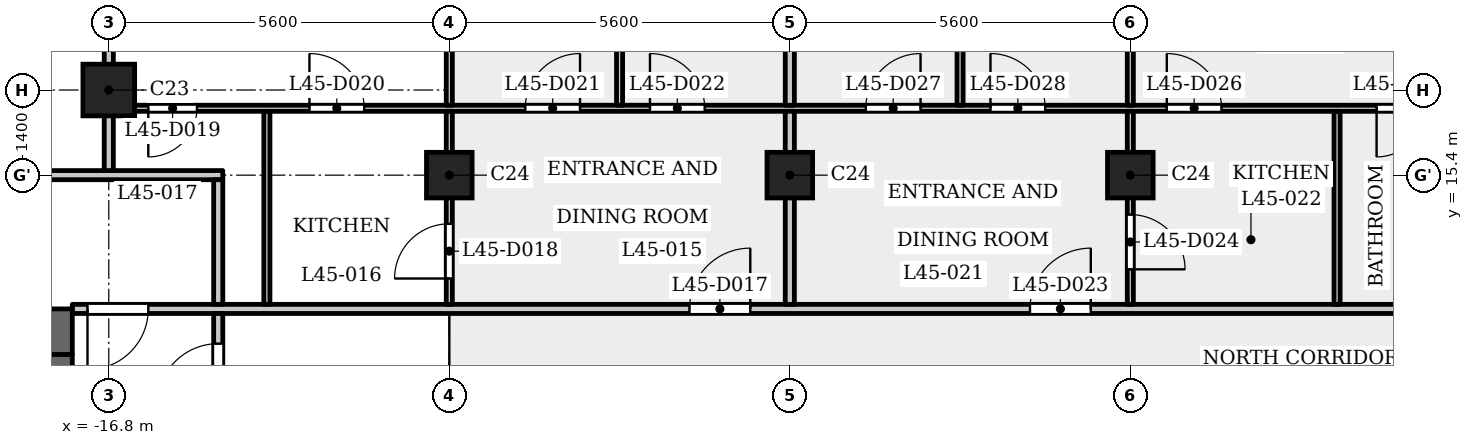
"""IFC4 building model, lengths in metres.
Left out: names, types, materials, properties, quantities, classifications, styles, units other than length and angle.
Written with IfcOpenShell. Run it as: python <this file> out.ifc"""

import sys

from ifc_helpers import new_model, si_unit, direction, frame, frame_2d, origin, origin_2d, place, context, subcontext, project, spatial, rectangle, extrude, element, fill, save


model = new_model("IFC4")
c1 = context("Model", 3, precision=1e-05, world=origin(), true_north=direction((0.0, 1.0)))
c2 = subcontext(c1, "Body", "Model", "MODEL_VIEW")
j1 = project(units=[si_unit("LENGTHUNIT", "METRE"), si_unit("PLANEANGLEUNIT", "RADIAN")], contexts=[c1])
p1 = place(None, origin())
s1 = spatial("IfcSite", under=j1, at=p1, CompositionType="ELEMENT")
p2 = place(p1, origin())
s2 = spatial("IfcBuilding", under=s1, at=p2, CompositionType="ELEMENT")
p3 = place(p2, frame((0.0, 0.0, 174.6)))
s3 = spatial("IfcBuildingStorey", under=s2, at=p3, CompositionType="ELEMENT", Elevation=174.6)
p4 = place(p3, frame((-16.8, 16.8, 0.0), z_axis=(0.0, 0.0, 1.0), x_axis=(1.0, 0.0, 0.0)))
e1 = element("IfcColumn", 1, at=p4, inside=s3, PredefinedType="COLUMN", context=c2, shape_type="SweptSolid", body=[
    extrude(rectangle(XDim=0.85, YDim=0.85, at=origin_2d()), origin(), (0.0, 0.0, 1.0), 3.5),
])
for number, where, z_axis, x_axis in (
    (2, (-11.2, 15.4, 0.0), (0.0, 0.0, 1.0), (1.0, 0.0, 0.0)),
    (3, (-5.6, 15.4, 0.0), (0.0, 0.0, 1.0), (1.0, 0.0, 0.0)),
    (4, (0.0, 15.4, 0.0), (0.0, 0.0, 1.0), (1.0, 0.0, 0.0)),
):
    element("IfcColumn", number, at=place(p3, frame(where, z_axis=z_axis, x_axis=x_axis)), inside=s3, PredefinedType="COLUMN", context=c2, shape_type="SweptSolid", body=[
        extrude(rectangle(XDim=0.75, YDim=0.75, at=origin_2d()), origin(), (0.0, 0.0, 1.0), 3.5),
    ])
p5 = place(p3, frame((-17.4, 12.825, 0.0), z_axis=(0.0, 0.0, 1.0), x_axis=(-1.0, 0.0, 0.0)))
e5 = element("IfcWall", 5, at=p5, inside=s3, PredefinedType="SHEAR", context=c2, shape_type="SweptSolid", body=[
    extrude(rectangle(XDim=10.4, YDim=0.75, at=frame_2d((5.2, 0.0))), origin(), (0.0, 0.0, 1.0), 3.15),
])
p6 = place(p3, frame((-17.6, -12.45, 0.0), z_axis=(0.0, 0.0, 1.0), x_axis=(0.0, 1.0, 0.0)))
e6 = element("IfcWall", 6, at=p6, inside=s3, PredefinedType="SHEAR", context=c2, shape_type="SweptSolid", body=[
    extrude(rectangle(XDim=24.9, YDim=0.4, at=frame_2d((12.45, 0.0))), origin(), (0.0, 0.0, 1.0), 3.15),
])
p7 = place(p6, frame((8.65, 0.0, 0.0)))
e7 = element("IfcOpeningElement", 7, at=p7, cuts=e6, PredefinedType="OPENING", context=c2, shape_type="SweptSolid", body=[
    extrude(rectangle(XDim=0.9, YDim=2.1, at=frame_2d((0.45, 1.05))), frame((0.0, 0.21, 0.0), z_axis=(0.0, -1.0, 0.0), x_axis=(1.0, 0.0, 0.0)), (0.0, 0.0, 1.0), 0.42),
])
p8 = place(p6, frame((15.6, 0.0, 0.0)))
e8 = element("IfcOpeningElement", 8, at=p8, cuts=e6, PredefinedType="OPENING", context=c2, shape_type="SweptSolid", body=[
    extrude(rectangle(XDim=1.1, YDim=2.1, at=frame_2d((0.55, 1.05))), frame((0.0, 0.21, 0.0), z_axis=(0.0, -1.0, 0.0), x_axis=(1.0, 0.0, 0.0)), (0.0, 0.0, 1.0), 0.42),
])
p9 = place(p6, frame((18.0, 0.0, 0.0)))
e9 = element("IfcOpeningElement", 9, at=p9, cuts=e6, PredefinedType="OPENING", context=c2, shape_type="SweptSolid", body=[
    extrude(rectangle(XDim=1.1, YDim=2.1, at=frame_2d((0.55, 1.05))), frame((0.0, 0.21, 0.0), z_axis=(0.0, -1.0, 0.0), x_axis=(1.0, 0.0, 0.0)), (0.0, 0.0, 1.0), 0.42),
])
p10 = place(p6, frame((23.025, 0.0, 0.0)))
e10 = element("IfcOpeningElement", 10, at=p10, cuts=e6, PredefinedType="OPENING", context=c2, shape_type="SweptSolid", body=[
    extrude(rectangle(XDim=1.1, YDim=2.1, at=frame_2d((0.55, 1.05))), frame((0.0, 0.21, 0.0), z_axis=(0.0, -1.0, 0.0), x_axis=(1.0, 0.0, 0.0)), (0.0, 0.0, 1.0), 0.42),
])
p11 = place(p6, frame((0.775, 0.0, 0.0)))
e11 = element("IfcOpeningElement", 11, at=p11, cuts=e6, PredefinedType="OPENING", context=c2, shape_type="SweptSolid", body=[
    extrude(rectangle(XDim=1.1, YDim=2.1, at=frame_2d((0.55, 1.05))), frame((0.0, 0.21, 0.0), z_axis=(0.0, -1.0, 0.0), x_axis=(1.0, 0.0, 0.0)), (0.0, 0.0, 1.0), 0.42),
])
p12 = place(p6, frame((12.925, 0.0, 0.0)))
e12 = element("IfcOpeningElement", 12, at=p12, cuts=e6, PredefinedType="OPENING", context=c2, shape_type="SweptSolid", body=[
    extrude(rectangle(XDim=1.8, YDim=2.1, at=frame_2d((0.9, 1.05))), frame((0.0, 0.21, 0.0), z_axis=(0.0, -1.0, 0.0), x_axis=(1.0, 0.0, 0.0)), (0.0, 0.0, 1.0), 0.42),
])
p13 = place(p3, frame((-17.4, 13.2, 0.0), z_axis=(0.0, 0.0, 1.0), x_axis=(1.0, 0.0, 0.0)))
e13 = element("IfcWall", 13, at=p13, inside=s3, PredefinedType="PARTITIONING", context=c2, shape_type="SweptSolid", body=[
    extrude(rectangle(XDim=34.8, YDim=0.15, at=frame_2d((17.4, 0.0))), origin(), (0.0, 0.0, 1.0), 3.15),
])
p14 = place(p13, frame((0.25, 0.0, 0.0)))
e14 = element("IfcOpeningElement", 14, at=p14, cuts=e13, PredefinedType="OPENING", context=c2, shape_type="SweptSolid", body=[
    extrude(rectangle(XDim=1.0, YDim=2.1, at=frame_2d((0.5, 1.05))), frame((0.0, 0.085, 0.0), z_axis=(0.0, -1.0, 0.0), x_axis=(1.0, 0.0, 0.0)), (0.0, 0.0, 1.0), 0.17),
])
p15 = place(p13, frame((33.65, 0.0, 0.0)))
e15 = element("IfcOpeningElement", 15, at=p15, cuts=e13, PredefinedType="OPENING", context=c2, shape_type="SweptSolid", body=[
    extrude(rectangle(XDim=1.0, YDim=2.1, at=frame_2d((0.5, 1.05))), frame((0.0, 0.085, 0.0), z_axis=(0.0, -1.0, 0.0), x_axis=(1.0, 0.0, 0.0)), (0.0, 0.0, 1.0), 0.17),
])
p16 = place(p13, frame((10.15, 0.0, 0.0)))
e16 = element("IfcOpeningElement", 16, at=p16, cuts=e13, PredefinedType="OPENING", context=c2, shape_type="SweptSolid", body=[
    extrude(rectangle(XDim=1.0, YDim=2.1, at=frame_2d((0.5, 1.05))), frame((0.0, 0.085, 0.0), z_axis=(0.0, -1.0, 0.0), x_axis=(1.0, 0.0, 0.0)), (0.0, 0.0, 1.0), 0.17),
])
p17 = place(p13, frame((15.75, 0.0, 0.0)))
e17 = element("IfcOpeningElement", 17, at=p17, cuts=e13, PredefinedType="OPENING", context=c2, shape_type="SweptSolid", body=[
    extrude(rectangle(XDim=1.0, YDim=2.1, at=frame_2d((0.5, 1.05))), frame((0.0, 0.085, 0.0), z_axis=(0.0, -1.0, 0.0), x_axis=(1.0, 0.0, 0.0)), (0.0, 0.0, 1.0), 0.17),
])
p18 = place(p13, frame((24.95, 0.0, 0.0)))
e18 = element("IfcOpeningElement", 18, at=p18, cuts=e13, PredefinedType="OPENING", context=c2, shape_type="SweptSolid", body=[
    extrude(rectangle(XDim=1.0, YDim=2.1, at=frame_2d((0.5, 1.05))), frame((0.0, 0.085, 0.0), z_axis=(0.0, -1.0, 0.0), x_axis=(1.0, 0.0, 0.0)), (0.0, 0.0, 1.0), 0.17),
])
p19 = place(p13, frame((29.95, 0.0, 0.0)))
e19 = element("IfcOpeningElement", 19, at=p19, cuts=e13, PredefinedType="OPENING", context=c2, shape_type="SweptSolid", body=[
    extrude(rectangle(XDim=1.0, YDim=2.1, at=frame_2d((0.5, 1.05))), frame((0.0, 0.085, 0.0), z_axis=(0.0, -1.0, 0.0), x_axis=(1.0, 0.0, 0.0)), (0.0, 0.0, 1.0), 0.17),
])
p20 = place(p3, frame((-27.484, 15.4, 0.0), z_axis=(0.0, 0.0, 1.0), x_axis=(1.0, 0.0, 0.0)))
e20 = element("IfcWall", 20, at=p20, inside=s3, PredefinedType="PARTITIONING", context=c2, shape_type="SweptSolid", body=[
    extrude(rectangle(XDim=12.559, YDim=0.15, at=frame_2d((6.279, 0.0))), origin(), (0.0, 0.0, 1.0), 3.15),
])
p21 = place(p20, frame((5.784, 0.0, 0.0)))
e21 = element("IfcOpeningElement", 21, at=p21, cuts=e20, PredefinedType="OPENING", context=c2, shape_type="SweptSolid", body=[
    extrude(rectangle(XDim=1.0, YDim=2.1, at=frame_2d((0.5, 1.05))), frame((0.0, 0.085, 0.0), z_axis=(0.0, -1.0, 0.0), x_axis=(1.0, 0.0, 0.0)), (0.0, 0.0, 1.0), 0.17),
])
p22 = place(p3, frame((-16.725, 16.5, 0.0), z_axis=(0.0, 0.0, 1.0), x_axis=(1.0, 0.0, 0.0)))
e22 = element("IfcWall", 22, at=p22, inside=s3, PredefinedType="PARTITIONING", context=c2, shape_type="SweptSolid", body=[
    extrude(rectangle(XDim=33.45, YDim=0.1, at=frame_2d((16.725, 0.0))), origin(), (0.0, 0.0, 1.0), 3.15),
])
p23 = place(p22, frame((0.575, 0.0, 0.0)))
e23 = element("IfcOpeningElement", 23, at=p23, cuts=e22, PredefinedType="OPENING", context=c2, shape_type="SweptSolid", body=[
    extrude(rectangle(XDim=0.8, YDim=2.1, at=frame_2d((0.4, 1.05))), frame((0.0, 0.06, 0.0), z_axis=(0.0, -1.0, 0.0), x_axis=(1.0, 0.0, 0.0)), (0.0, 0.0, 1.0), 0.12),
])
p24 = place(p22, frame((3.225, 0.0, 0.0)))
e24 = element("IfcOpeningElement", 24, at=p24, cuts=e22, PredefinedType="OPENING", context=c2, shape_type="SweptSolid", body=[
    extrude(rectangle(XDim=0.9, YDim=2.1, at=frame_2d((0.45, 1.05))), frame((0.0, 0.06, 0.0), z_axis=(0.0, -1.0, 0.0), x_axis=(1.0, 0.0, 0.0)), (0.0, 0.0, 1.0), 0.12),
])
p25 = place(p22, frame((6.775, 0.0, 0.0)))
e25 = element("IfcOpeningElement", 25, at=p25, cuts=e22, PredefinedType="OPENING", context=c2, shape_type="SweptSolid", body=[
    extrude(rectangle(XDim=0.9, YDim=2.1, at=frame_2d((0.45, 1.05))), frame((0.0, 0.06, 0.0), z_axis=(0.0, -1.0, 0.0), x_axis=(1.0, 0.0, 0.0)), (0.0, 0.0, 1.0), 0.12),
])
p26 = place(p22, frame((8.825, 0.0, 0.0)))
e26 = element("IfcOpeningElement", 26, at=p26, cuts=e22, PredefinedType="OPENING", context=c2, shape_type="SweptSolid", body=[
    extrude(rectangle(XDim=0.9, YDim=2.1, at=frame_2d((0.45, 1.05))), frame((0.0, 0.06, 0.0), z_axis=(0.0, -1.0, 0.0), x_axis=(1.0, 0.0, 0.0)), (0.0, 0.0, 1.0), 0.12),
])
p27 = place(p22, frame((20.775, 0.0, 0.0)))
e27 = element("IfcOpeningElement", 27, at=p27, cuts=e22, PredefinedType="OPENING", context=c2, shape_type="SweptSolid", body=[
    extrude(rectangle(XDim=0.8, YDim=2.1, at=frame_2d((0.4, 1.05))), frame((0.0, 0.06, 0.0), z_axis=(0.0, -1.0, 0.0), x_axis=(1.0, 0.0, 0.0)), (0.0, 0.0, 1.0), 0.12),
])
p28 = place(p22, frame((17.325, 0.0, 0.0)))
e28 = element("IfcOpeningElement", 28, at=p28, cuts=e22, PredefinedType="OPENING", context=c2, shape_type="SweptSolid", body=[
    extrude(rectangle(XDim=0.9, YDim=2.1, at=frame_2d((0.45, 1.05))), frame((0.0, 0.06, 0.0), z_axis=(0.0, -1.0, 0.0), x_axis=(1.0, 0.0, 0.0)), (0.0, 0.0, 1.0), 0.12),
])
p29 = place(p22, frame((12.375, 0.0, 0.0)))
e29 = element("IfcOpeningElement", 29, at=p29, cuts=e22, PredefinedType="OPENING", context=c2, shape_type="SweptSolid", body=[
    extrude(rectangle(XDim=0.9, YDim=2.1, at=frame_2d((0.45, 1.05))), frame((0.0, 0.06, 0.0), z_axis=(0.0, -1.0, 0.0), x_axis=(1.0, 0.0, 0.0)), (0.0, 0.0, 1.0), 0.12),
])
p30 = place(p22, frame((14.425, 0.0, 0.0)))
e30 = element("IfcOpeningElement", 30, at=p30, cuts=e22, PredefinedType="OPENING", context=c2, shape_type="SweptSolid", body=[
    extrude(rectangle(XDim=0.9, YDim=2.1, at=frame_2d((0.45, 1.05))), frame((0.0, 0.06, 0.0), z_axis=(0.0, -1.0, 0.0), x_axis=(1.0, 0.0, 0.0)), (0.0, 0.0, 1.0), 0.12),
])
p31 = place(p22, frame((26.575, 0.0, 0.0)))
e31 = element("IfcOpeningElement", 31, at=p31, cuts=e22, PredefinedType="OPENING", context=c2, shape_type="SweptSolid", body=[
    extrude(rectangle(XDim=0.8, YDim=2.1, at=frame_2d((0.4, 1.05))), frame((0.0, 0.06, 0.0), z_axis=(0.0, -1.0, 0.0), x_axis=(1.0, 0.0, 0.0)), (0.0, 0.0, 1.0), 0.12),
])
p32 = place(p22, frame((23.775, 0.0, 0.0)))
e32 = element("IfcOpeningElement", 32, at=p32, cuts=e22, PredefinedType="OPENING", context=c2, shape_type="SweptSolid", body=[
    extrude(rectangle(XDim=0.9, YDim=2.1, at=frame_2d((0.45, 1.05))), frame((0.0, 0.06, 0.0), z_axis=(0.0, -1.0, 0.0), x_axis=(1.0, 0.0, 0.0)), (0.0, 0.0, 1.0), 0.12),
])
p33 = place(p22, frame((32.075, 0.0, 0.0)))
e33 = element("IfcOpeningElement", 33, at=p33, cuts=e22, PredefinedType="OPENING", context=c2, shape_type="SweptSolid", body=[
    extrude(rectangle(XDim=0.8, YDim=2.1, at=frame_2d((0.4, 1.05))), frame((0.0, 0.06, 0.0), z_axis=(0.0, -1.0, 0.0), x_axis=(1.0, 0.0, 0.0)), (0.0, 0.0, 1.0), 0.12),
])
p34 = place(p22, frame((29.375, 0.0, 0.0)))
e34 = element("IfcOpeningElement", 34, at=p34, cuts=e22, PredefinedType="OPENING", context=c2, shape_type="SweptSolid", body=[
    extrude(rectangle(XDim=0.9, YDim=2.1, at=frame_2d((0.45, 1.05))), frame((0.0, 0.06, 0.0), z_axis=(0.0, -1.0, 0.0), x_axis=(1.0, 0.0, 0.0)), (0.0, 0.0, 1.0), 0.12),
])
p35 = place(p3, frame((-16.8, 15.475, 0.0), z_axis=(0.0, 0.0, 1.0), x_axis=(0.0, 1.0, 0.0)))
e35 = element("IfcWall", 35, at=p35, inside=s3, PredefinedType="PARTITIONING", context=c2, shape_type="SweptSolid", body=[
    extrude(rectangle(XDim=7.405, YDim=0.15, at=frame_2d((3.702, 0.0))), origin(), (0.0, 0.0, 1.0), 3.15),
])
p36 = place(p3, frame((-15.0, 6.769, 0.0), z_axis=(0.0, 0.0, 1.0), x_axis=(0.0, 1.0, 0.0)))
e36 = element("IfcWall", 36, at=p36, inside=s3, PredefinedType="PARTITIONING", context=c2, shape_type="SweptSolid", body=[
    extrude(rectangle(XDim=6.356, YDim=0.15, at=frame_2d((3.178, 0.0))), origin(), (0.0, 0.0, 1.0), 3.15),
])
p37 = place(p36, frame((4.86, 0.0, 0.0)))
e37 = element("IfcOpeningElement", 37, at=p37, cuts=e36, PredefinedType="OPENING", context=c2, shape_type="SweptSolid", body=[
    extrude(rectangle(XDim=1.0, YDim=2.1, at=frame_2d((0.5, 1.05))), frame((0.0, 0.085, 0.0), z_axis=(0.0, -1.0, 0.0), x_axis=(1.0, 0.0, 0.0)), (0.0, 0.0, 1.0), 0.17),
])
p38 = place(p3, frame((-15.0, 13.275, 0.0), z_axis=(0.0, 0.0, 1.0), x_axis=(0.0, 1.0, 0.0)))
e38 = element("IfcWall", 38, at=p38, inside=s3, PredefinedType="PARTITIONING", context=c2, shape_type="SweptSolid", body=[
    extrude(rectangle(XDim=2.05, YDim=0.15, at=frame_2d((1.025, 0.0))), origin(), (0.0, 0.0, 1.0), 3.15),
])
p39 = place(p3, frame((-14.2, 13.275, 0.0), z_axis=(0.0, 0.0, 1.0), x_axis=(0.0, 1.0, 0.0)))
e39 = element("IfcWall", 39, at=p39, inside=s3, PredefinedType="PARTITIONING", context=c2, shape_type="SweptSolid", body=[
    extrude(rectangle(XDim=3.175, YDim=0.1, at=frame_2d((1.587, 0.0))), origin(), (0.0, 0.0, 1.0), 3.15),
])
p40 = place(p3, frame((-11.2, 13.275, 0.0), z_axis=(0.0, 0.0, 1.0), x_axis=(0.0, 1.0, 0.0)))
e40 = element("IfcWall", 40, at=p40, inside=s3, PredefinedType="PARTITIONING", context=c2, shape_type="SweptSolid", body=[
    extrude(rectangle(XDim=3.175, YDim=0.1, at=frame_2d((1.587, 0.0))), origin(), (0.0, 0.0, 1.0), 3.15),
])
p41 = place(p40, frame((0.425, 0.0, 0.0)))
e41 = element("IfcOpeningElement", 41, at=p41, cuts=e40, PredefinedType="OPENING", context=c2, shape_type="SweptSolid", body=[
    extrude(rectangle(XDim=0.9, YDim=2.1, at=frame_2d((0.45, 1.05))), frame((0.0, 0.06, 0.0), z_axis=(0.0, -1.0, 0.0), x_axis=(1.0, 0.0, 0.0)), (0.0, 0.0, 1.0), 0.12),
])
p42 = place(p3, frame((-11.2, 16.55, 0.0), z_axis=(0.0, 0.0, 1.0), x_axis=(0.0, 1.0, 0.0)))
e42 = element("IfcWall", 42, at=p42, inside=s3, PredefinedType="PARTITIONING", context=c2, shape_type="SweptSolid", body=[
    extrude(rectangle(XDim=6.33, YDim=0.1, at=frame_2d((3.165, 0.0))), origin(), (0.0, 0.0, 1.0), 3.15),
])
p43 = place(p3, frame((-8.4, 16.55, 0.0), z_axis=(0.0, 0.0, 1.0), x_axis=(0.0, 1.0, 0.0)))
e43 = element("IfcWall", 43, at=p43, inside=s3, PredefinedType="PARTITIONING", context=c2, shape_type="SweptSolid", body=[
    extrude(rectangle(XDim=5.53, YDim=0.1, at=frame_2d((2.765, 0.0))), origin(), (0.0, 0.0, 1.0), 3.15),
])
p44 = place(p3, frame((-5.6, 13.275, 0.0), z_axis=(0.0, 0.0, 1.0), x_axis=(0.0, 1.0, 0.0)))
e44 = element("IfcWall", 44, at=p44, inside=s3, PredefinedType="PARTITIONING", context=c2, shape_type="SweptSolid", body=[
    extrude(rectangle(XDim=3.175, YDim=0.15, at=frame_2d((1.587, 0.0))), origin(), (0.0, 0.0, 1.0), 3.15),
])
p45 = place(p3, frame((-5.6, 16.55, 0.0), z_axis=(0.0, 0.0, 1.0), x_axis=(0.0, 1.0, 0.0)))
e45 = element("IfcWall", 45, at=p45, inside=s3, PredefinedType="PARTITIONING", context=c2, shape_type="SweptSolid", body=[
    extrude(rectangle(XDim=6.33, YDim=0.15, at=frame_2d((3.165, 0.0))), origin(), (0.0, 0.0, 1.0), 3.15),
])
p46 = place(p3, frame((-2.8, 16.55, 0.0), z_axis=(0.0, 0.0, 1.0), x_axis=(0.0, 1.0, 0.0)))
e46 = element("IfcWall", 46, at=p46, inside=s3, PredefinedType="PARTITIONING", context=c2, shape_type="SweptSolid", body=[
    extrude(rectangle(XDim=5.53, YDim=0.1, at=frame_2d((2.765, 0.0))), origin(), (0.0, 0.0, 1.0), 3.15),
])
p47 = place(p3, frame((0.0, 13.275, 0.0), z_axis=(0.0, 0.0, 1.0), x_axis=(0.0, 1.0, 0.0)))
e47 = element("IfcWall", 47, at=p47, inside=s3, PredefinedType="PARTITIONING", context=c2, shape_type="SweptSolid", body=[
    extrude(rectangle(XDim=3.175, YDim=0.1, at=frame_2d((1.587, 0.0))), origin(), (0.0, 0.0, 1.0), 3.15),
])
p48 = place(p47, frame((0.576, 0.0, 0.0)))
e48 = element("IfcOpeningElement", 48, at=p48, cuts=e47, PredefinedType="OPENING", context=c2, shape_type="SweptSolid", body=[
    extrude(rectangle(XDim=0.9, YDim=2.1, at=frame_2d((0.45, 1.05))), frame((0.0, 0.06, 0.0), z_axis=(0.0, -1.0, 0.0), x_axis=(1.0, 0.0, 0.0)), (0.0, 0.0, 1.0), 0.12),
])
p49 = place(p3, frame((0.0, 16.55, 0.0), z_axis=(0.0, 0.0, 1.0), x_axis=(0.0, 1.0, 0.0)))
e49 = element("IfcWall", 49, at=p49, inside=s3, PredefinedType="PARTITIONING", context=c2, shape_type="SweptSolid", body=[
    extrude(rectangle(XDim=6.33, YDim=0.1, at=frame_2d((3.165, 0.0))), origin(), (0.0, 0.0, 1.0), 3.15),
])
p50 = place(p3, frame((3.4, 13.275, 0.0), z_axis=(0.0, 0.0, 1.0), x_axis=(0.0, 1.0, 0.0)))
e50 = element("IfcWall", 50, at=p50, inside=s3, PredefinedType="PARTITIONING", context=c2, shape_type="SweptSolid", body=[
    extrude(rectangle(XDim=3.175, YDim=0.1, at=frame_2d((1.587, 0.0))), origin(), (0.0, 0.0, 1.0), 3.15),
])
p51 = place(p37, origin())
e51 = element("IfcDoor", 51, at=p51, inside=s3, OperationType="SINGLE_SWING_RIGHT", PredefinedType="DOOR", context=c2, shape_type="SweptSolid", body=[
    extrude(rectangle(XDim=1.0, YDim=2.1, at=frame_2d((0.5, 1.05))), frame((0.0, 0.025, 0.0), z_axis=(0.0, -1.0, 0.0), x_axis=(1.0, 0.0, 0.0)), (0.0, 0.0, 1.0), 0.05),
])
fill(e37, e51)
p52 = place(p14, origin())
e52 = element("IfcDoor", 52, at=p52, inside=s3, OperationType="SINGLE_SWING_LEFT", PredefinedType="DOOR", context=c2, shape_type="SweptSolid", body=[
    extrude(rectangle(XDim=1.0, YDim=2.1, at=frame_2d((0.5, 1.05))), frame((0.0, 0.025, 0.0), z_axis=(0.0, -1.0, 0.0), x_axis=(1.0, 0.0, 0.0)), (0.0, 0.0, 1.0), 0.05),
])
fill(e14, e52)
p53 = place(p16, origin())
e53 = element("IfcDoor", 53, at=p53, inside=s3, OperationType="SINGLE_SWING_LEFT", PredefinedType="DOOR", context=c2, shape_type="SweptSolid", body=[
    extrude(rectangle(XDim=1.0, YDim=2.1, at=frame_2d((0.5, 1.05))), frame((0.0, 0.025, 0.0), z_axis=(0.0, -1.0, 0.0), x_axis=(1.0, 0.0, 0.0)), (0.0, 0.0, 1.0), 0.05),
])
fill(e16, e53)
p54 = place(p41, origin())
e54 = element("IfcDoor", 54, at=p54, inside=s3, OperationType="SINGLE_SWING_RIGHT", PredefinedType="DOOR", context=c2, shape_type="SweptSolid", body=[
    extrude(rectangle(XDim=0.9, YDim=2.1, at=frame_2d((0.45, 1.05))), frame((0.0, 0.025, 0.0), z_axis=(0.0, -1.0, 0.0), x_axis=(1.0, 0.0, 0.0)), (0.0, 0.0, 1.0), 0.05),
])
fill(e41, e54)
p55 = place(p23, origin())
e55 = element("IfcDoor", 55, at=p55, inside=s3, OperationType="SINGLE_SWING_LEFT", PredefinedType="DOOR", context=c2, shape_type="SweptSolid", body=[
    extrude(rectangle(XDim=0.8, YDim=2.1, at=frame_2d((0.4, 1.05))), frame((0.0, 0.025, 0.0), z_axis=(0.0, -1.0, 0.0), x_axis=(1.0, 0.0, 0.0)), (0.0, 0.0, 1.0), 0.05),
])
fill(e23, e55)
p56 = place(p24, origin())
e56 = element("IfcDoor", 56, at=p56, inside=s3, OperationType="SINGLE_SWING_RIGHT", PredefinedType="DOOR", context=c2, shape_type="SweptSolid", body=[
    extrude(rectangle(XDim=0.9, YDim=2.1, at=frame_2d((0.45, 1.05))), frame((0.0, 0.025, 0.0), z_axis=(0.0, -1.0, 0.0), x_axis=(1.0, 0.0, 0.0)), (0.0, 0.0, 1.0), 0.05),
])
fill(e24, e56)
p57 = place(p25, origin())
e57 = element("IfcDoor", 57, at=p57, inside=s3, OperationType="SINGLE_SWING_LEFT", PredefinedType="DOOR", context=c2, shape_type="SweptSolid", body=[
    extrude(rectangle(XDim=0.9, YDim=2.1, at=frame_2d((0.45, 1.05))), frame((0.0, 0.025, 0.0), z_axis=(0.0, -1.0, 0.0), x_axis=(1.0, 0.0, 0.0)), (0.0, 0.0, 1.0), 0.05),
])
fill(e25, e57)
p58 = place(p26, origin())
e58 = element("IfcDoor", 58, at=p58, inside=s3, OperationType="SINGLE_SWING_RIGHT", PredefinedType="DOOR", context=c2, shape_type="SweptSolid", body=[
    extrude(rectangle(XDim=0.9, YDim=2.1, at=frame_2d((0.45, 1.05))), frame((0.0, 0.025, 0.0), z_axis=(0.0, -1.0, 0.0), x_axis=(1.0, 0.0, 0.0)), (0.0, 0.0, 1.0), 0.05),
])
fill(e26, e58)
p59 = place(p17, origin())
e59 = element("IfcDoor", 59, at=p59, inside=s3, OperationType="SINGLE_SWING_LEFT", PredefinedType="DOOR", context=c2, shape_type="SweptSolid", body=[
    extrude(rectangle(XDim=1.0, YDim=2.1, at=frame_2d((0.5, 1.05))), frame((0.0, 0.025, 0.0), z_axis=(0.0, -1.0, 0.0), x_axis=(1.0, 0.0, 0.0)), (0.0, 0.0, 1.0), 0.05),
])
fill(e17, e59)
p60 = place(p48, origin())
e60 = element("IfcDoor", 60, at=p60, inside=s3, OperationType="SINGLE_SWING_LEFT", PredefinedType="DOOR", context=c2, shape_type="SweptSolid", body=[
    extrude(rectangle(XDim=0.9, YDim=2.1, at=frame_2d((0.45, 1.05))), frame((0.0, 0.025, 0.0), z_axis=(0.0, -1.0, 0.0), x_axis=(1.0, 0.0, 0.0)), (0.0, 0.0, 1.0), 0.05),
])
fill(e48, e60)
p61 = place(p27, origin())
e61 = element("IfcDoor", 61, at=p61, inside=s3, OperationType="SINGLE_SWING_LEFT", PredefinedType="DOOR", context=c2, shape_type="SweptSolid", body=[
    extrude(rectangle(XDim=0.8, YDim=2.1, at=frame_2d((0.4, 1.05))), frame((0.0, 0.025, 0.0), z_axis=(0.0, -1.0, 0.0), x_axis=(1.0, 0.0, 0.0)), (0.0, 0.0, 1.0), 0.05),
])
fill(e27, e61)
p62 = place(p28, origin())
e62 = element("IfcDoor", 62, at=p62, inside=s3, OperationType="SINGLE_SWING_RIGHT", PredefinedType="DOOR", context=c2, shape_type="SweptSolid", body=[
    extrude(rectangle(XDim=0.9, YDim=2.1, at=frame_2d((0.45, 1.05))), frame((0.0, 0.025, 0.0), z_axis=(0.0, -1.0, 0.0), x_axis=(1.0, 0.0, 0.0)), (0.0, 0.0, 1.0), 0.05),
])
fill(e28, e62)
p63 = place(p29, origin())
e63 = element("IfcDoor", 63, at=p63, inside=s3, OperationType="SINGLE_SWING_LEFT", PredefinedType="DOOR", context=c2, shape_type="SweptSolid", body=[
    extrude(rectangle(XDim=0.9, YDim=2.1, at=frame_2d((0.45, 1.05))), frame((0.0, 0.025, 0.0), z_axis=(0.0, -1.0, 0.0), x_axis=(1.0, 0.0, 0.0)), (0.0, 0.0, 1.0), 0.05),
])
fill(e29, e63)
p64 = place(p30, origin())
e64 = element("IfcDoor", 64, at=p64, inside=s3, OperationType="SINGLE_SWING_RIGHT", PredefinedType="DOOR", context=c2, shape_type="SweptSolid", body=[
    extrude(rectangle(XDim=0.9, YDim=2.1, at=frame_2d((0.45, 1.05))), frame((0.0, 0.025, 0.0), z_axis=(0.0, -1.0, 0.0), x_axis=(1.0, 0.0, 0.0)), (0.0, 0.0, 1.0), 0.05),
])
fill(e30, e64)
save(model, sys.argv[1])
